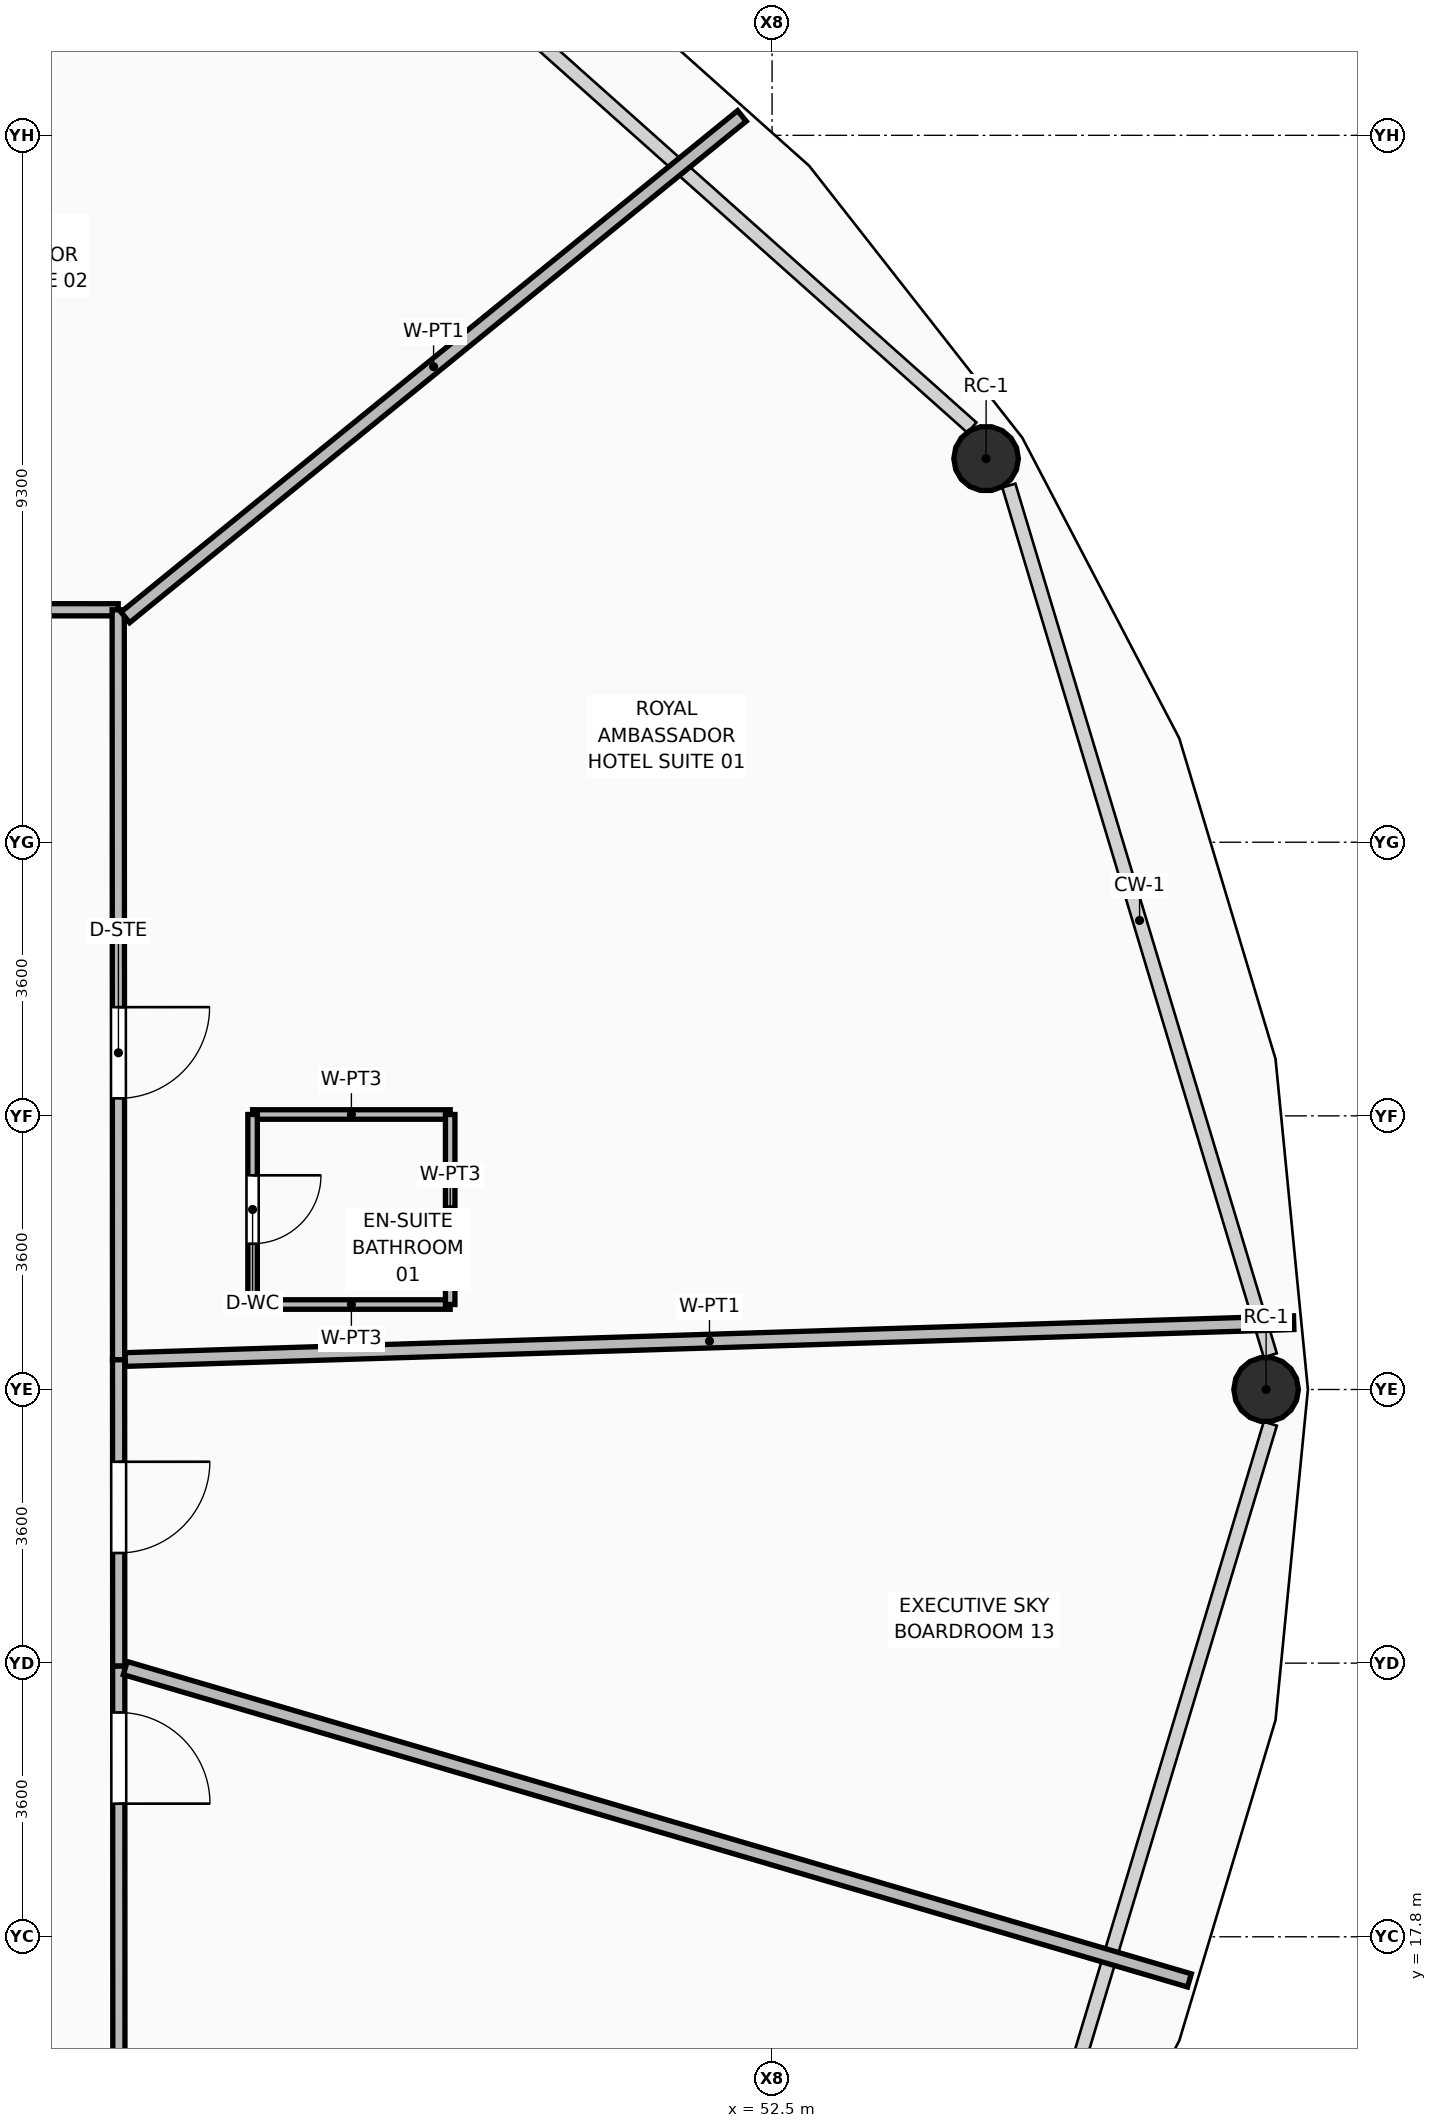
"""IFC4 building model, lengths in metres.
Left out: names, types, materials, properties, quantities, classifications, styles, units other than length and angle.
Written with IfcOpenShell. Run it as: python <this file> out.ifc"""

import sys

from ifc_helpers import new_model, si_unit, direction, frame, frame_2d, origin, origin_2d, place, context, subcontext, project, spatial, rectangle, hollow_circle, extrude, element, fill, save


model = new_model("IFC4")
c1 = context("Model", 3, precision=1e-05, world=origin(), true_north=direction((0.0, 1.0)))
c2 = subcontext(c1, "Body", "Model", "MODEL_VIEW")
j1 = project(units=[si_unit("LENGTHUNIT", "METRE"), si_unit("PLANEANGLEUNIT", "RADIAN")], contexts=[c1])
p1 = place(None, origin())
s1 = spatial("IfcSite", under=j1, at=p1, CompositionType="ELEMENT")
p2 = place(p1, origin())
s2 = spatial("IfcBuilding", under=s1, at=p2, CompositionType="ELEMENT")
p3 = place(p2, frame((0.0, 0.0, 87.0)))
s3 = spatial("IfcBuildingStorey", under=s2, at=p3, CompositionType="ELEMENT", Elevation=87.0)
p4 = place(p3, frame((59.0, 25.0, 0.0), z_axis=(-0.127508130523, 0.0, 0.991837525329), x_axis=(0.0, -1.0, 0.0)))
e1 = element("IfcColumn", 1, at=p4, inside=s3, PredefinedType="COLUMN", context=c2, shape_type="SweptSolid", body=[
    extrude(hollow_circle(Radius=0.425, WallThickness=0.04, at=origin_2d()), origin(), (0.0, 0.0, 1.0), 3.529),
])
p5 = place(p3, frame((55.316, 37.247, 0.0), z_axis=(-0.110532853476, -0.057031353328, 0.992234807412), x_axis=(0.458529519134, -0.888679177253, 0.0)))
e2 = element("IfcColumn", 2, at=p5, inside=s3, PredefinedType="COLUMN", context=c2, shape_type="SweptSolid", body=[
    extrude(hollow_circle(Radius=0.425, WallThickness=0.04, at=origin_2d()), origin(), (0.0, 0.0, 1.0), 3.527),
])
p6 = place(p3, frame((33.096, 35.26, 0.0), z_axis=(0.0, 0.0, 1.0), x_axis=(0.999999983651, -0.000180827736, 0.0)))
e3 = element("IfcWall", 3, at=p6, inside=s3, PredefinedType="PARTITIONING", context=c2, shape_type="SweptSolid", body=[
    extrude(rectangle(XDim=10.801, YDim=0.16, at=frame_2d((5.4, 0.0))), origin(), (0.0, 0.0, 1.0), 2.858),
])
p7 = place(p6, frame((4.801, 0.0, 0.0)))
e4 = element("IfcOpeningElement", 4, at=p7, cuts=e3, PredefinedType="OPENING", context=c2, shape_type="SweptSolid", body=[
    extrude(rectangle(XDim=1.2, YDim=2.1, at=frame_2d((0.6, 1.05))), frame((0.0, 0.09, 0.0), z_axis=(0.0, -1.0, 0.0), x_axis=(1.0, 0.0, 0.0)), (0.0, 0.0, 1.0), 0.18),
])
p8 = place(p3, frame((43.897, 35.258, 0.0), z_axis=(0.0, 0.0, 1.0), x_axis=(0.000519608986, -0.999999865003, 0.0)))
e5 = element("IfcWall", 5, at=p8, inside=s3, PredefinedType="PARTITIONING", context=c2, shape_type="SweptSolid", body=[
    extrude(rectangle(XDim=9.867, YDim=0.16, at=frame_2d((4.934, 0.0))), origin(), (0.0, 0.0, 1.0), 2.858),
])
p9 = place(p8, frame((5.228, 0.0, 0.0)))
e6 = element("IfcOpeningElement", 6, at=p9, cuts=e5, PredefinedType="OPENING", context=c2, shape_type="SweptSolid", body=[
    extrude(rectangle(XDim=1.2, YDim=2.1, at=frame_2d((0.6, 1.05))), frame((0.0, 0.09, 0.0), z_axis=(0.0, -1.0, 0.0), x_axis=(1.0, 0.0, 0.0)), (0.0, 0.0, 1.0), 0.18),
])
p10 = place(p3, frame((43.902, 25.391, 0.0), z_axis=(0.0, 0.0, 1.0), x_axis=(0.000484525411, -0.999999882618, 0.0)))
e7 = element("IfcWall", 7, at=p10, inside=s3, PredefinedType="PARTITIONING", context=c2, shape_type="SweptSolid", body=[
    extrude(rectangle(XDim=4.031, YDim=0.16, at=frame_2d((2.016, 0.0))), origin(), (0.0, 0.0, 1.0), 2.858),
])
p11 = place(p10, frame((1.342, 0.0, 0.0)))
e8 = element("IfcOpeningElement", 8, at=p11, cuts=e7, PredefinedType="OPENING", context=c2, shape_type="SweptSolid", body=[
    extrude(rectangle(XDim=1.2, YDim=2.1, at=frame_2d((0.6, 1.05))), frame((0.0, 0.09, 0.0), z_axis=(0.0, -1.0, 0.0), x_axis=(1.0, 0.0, 0.0)), (0.0, 0.0, 1.0), 0.18),
])
p12 = place(p3, frame((43.904, 21.36, 0.0), z_axis=(0.0, 0.0, 1.0), x_axis=(0.000381916237, -0.99999992707, 0.0)))
e9 = element("IfcWall", 9, at=p12, inside=s3, PredefinedType="PARTITIONING", context=c2, shape_type="SweptSolid", body=[
    extrude(rectangle(XDim=5.114, YDim=0.16, at=frame_2d((2.557, 0.0))), origin(), (0.0, 0.0, 1.0), 2.858),
])
p13 = place(p12, frame((0.609, 0.0, 0.0)))
e10 = element("IfcOpeningElement", 10, at=p13, cuts=e9, PredefinedType="OPENING", context=c2, shape_type="SweptSolid", body=[
    extrude(rectangle(XDim=1.2, YDim=2.1, at=frame_2d((0.6, 1.05))), frame((0.0, 0.09, 0.0), z_axis=(0.0, -1.0, 0.0), x_axis=(1.0, 0.0, 0.0)), (0.0, 0.0, 1.0), 0.18),
])
p14 = place(p3, frame((43.99, 25.394, 0.0), z_axis=(0.0, 0.0, 1.0), x_axis=(0.999502990343, 0.031524154155, 0.0)))
e11 = element("IfcWall", 11, at=p14, inside=s3, PredefinedType="PARTITIONING", context=c2, shape_type="SweptSolid", body=[
    extrude(rectangle(XDim=15.381, YDim=0.18, at=frame_2d((7.69, 0.0))), origin(), (0.0, 0.0, 1.0), 2.705),
])
p15 = place(p3, frame((43.99, 35.158, 0.0), z_axis=(0.0, 0.0, 1.0), x_axis=(0.775876125328, 0.630885281288, 0.0)))
e12 = element("IfcWall", 12, at=p15, inside=s3, PredefinedType="PARTITIONING", context=c2, shape_type="SweptSolid", body=[
    extrude(rectangle(XDim=10.457, YDim=0.18, at=frame_2d((5.228, 0.0))), origin(), (0.0, 0.0, 1.0), 2.705),
])
p16 = place(p3, frame((43.99, 21.335, 0.0), z_axis=(0.0, 0.0, 1.0), x_axis=(0.959533182325, -0.281595582383, 0.0)))
e13 = element("IfcWall", 13, at=p16, inside=s3, PredefinedType="PARTITIONING", context=c2, shape_type="SweptSolid", body=[
    extrude(rectangle(XDim=14.592, YDim=0.18, at=frame_2d((7.296, 0.0))), origin(), (0.0, 0.0, 1.0), 2.705),
])
for number, where, z_axis, x_axis in (
    (14, (45.665, 26.118, 0.0), (0.0, 0.0, 1.0), (1.0, 0.0, 0.0)),
    (15, (45.665, 28.618, 0.0), (0.0, 0.0, 1.0), (1.0, 0.0, 0.0)),
):
    element("IfcWall", number, at=place(p3, frame(where, z_axis=z_axis, x_axis=x_axis)), inside=s3, PredefinedType="PARTITIONING", context=c2, shape_type="SweptSolid", body=[
        extrude(rectangle(XDim=2.6, YDim=0.125, at=frame_2d((1.3, 0.0))), origin(), (0.0, 0.0, 1.0), 3.48),
    ])
p17 = place(p3, frame((45.665, 26.118, 0.0), z_axis=(0.0, 0.0, 1.0), x_axis=(0.0, 1.0, 0.0)))
e16 = element("IfcWall", 16, at=p17, inside=s3, PredefinedType="PARTITIONING", context=c2, shape_type="SweptSolid", body=[
    extrude(rectangle(XDim=2.5, YDim=0.125, at=frame_2d((1.25, 0.0))), origin(), (0.0, 0.0, 1.0), 3.48),
])
p18 = place(p17, frame((0.8, 0.0, 0.0)))
e17 = element("IfcOpeningElement", 17, at=p18, cuts=e16, PredefinedType="OPENING", context=c2, shape_type="SweptSolid", body=[
    extrude(rectangle(XDim=0.9, YDim=2.1, at=frame_2d((0.45, 1.05))), frame((0.0, 0.073, 0.0), z_axis=(0.0, -1.0, 0.0), x_axis=(1.0, 0.0, 0.0)), (0.0, 0.0, 1.0), 0.145),
])
p19 = place(p3, frame((48.265, 26.118, 0.0), z_axis=(0.0, 0.0, 1.0), x_axis=(0.0, 1.0, 0.0)))
e18 = element("IfcWall", 18, at=p19, inside=s3, PredefinedType="PARTITIONING", context=c2, shape_type="SweptSolid", body=[
    extrude(rectangle(XDim=2.5, YDim=0.125, at=frame_2d((1.25, 0.0))), origin(), (0.0, 0.0, 1.0), 3.48),
])
p20 = place(p18, frame((0.9, 0.0, 0.0), z_axis=(0.0, 0.0, 1.0), x_axis=(-1.0, 0.0, 0.0)))
e19 = element("IfcDoor", 19, at=p20, inside=s3, OperationType="SINGLE_SWING_LEFT", PredefinedType="DOOR", context=c2, shape_type="SweptSolid", body=[
    extrude(rectangle(XDim=0.9, YDim=2.1, at=frame_2d((0.45, 1.05))), frame((0.0, 0.025, 0.0), z_axis=(0.0, -1.0, 0.0), x_axis=(1.0, 0.0, 0.0)), (0.0, 0.0, 1.0), 0.05),
])
fill(e17, e19)
p21 = place(p9, origin())
e20 = element("IfcDoor", 20, at=p21, inside=s3, OperationType="SINGLE_SWING_LEFT", PredefinedType="DOOR", context=c2, shape_type="SweptSolid", body=[
    extrude(rectangle(XDim=1.2, YDim=2.1, at=frame_2d((0.6, 1.05))), frame((0.0, 0.025, 0.0), z_axis=(0.0, -1.0, 0.0), x_axis=(1.0, 0.0, 0.0)), (0.0, 0.0, 1.0), 0.05),
])
fill(e6, e20)
p22 = place(p13, origin())
e21 = element("IfcDoor", 21, at=p22, inside=s3, OperationType="SINGLE_SWING_RIGHT", PredefinedType="DOOR", context=c2, shape_type="SweptSolid", body=[
    extrude(rectangle(XDim=1.2, YDim=2.1, at=frame_2d((0.6, 1.05))), frame((0.0, 0.025, 0.0), z_axis=(0.0, -1.0, 0.0), x_axis=(1.0, 0.0, 0.0)), (0.0, 0.0, 1.0), 0.05),
])
fill(e10, e21)
p23 = place(p11, origin())
e22 = element("IfcDoor", 22, at=p23, inside=s3, OperationType="SINGLE_SWING_LEFT", PredefinedType="DOOR", context=c2, shape_type="SweptSolid", body=[
    extrude(rectangle(XDim=1.2, YDim=2.1, at=frame_2d((0.6, 1.05))), frame((0.0, 0.025, 0.0), z_axis=(0.0, -1.0, 0.0), x_axis=(1.0, 0.0, 0.0)), (0.0, 0.0, 1.0), 0.05),
])
fill(e8, e22)
save(model, sys.argv[1])
